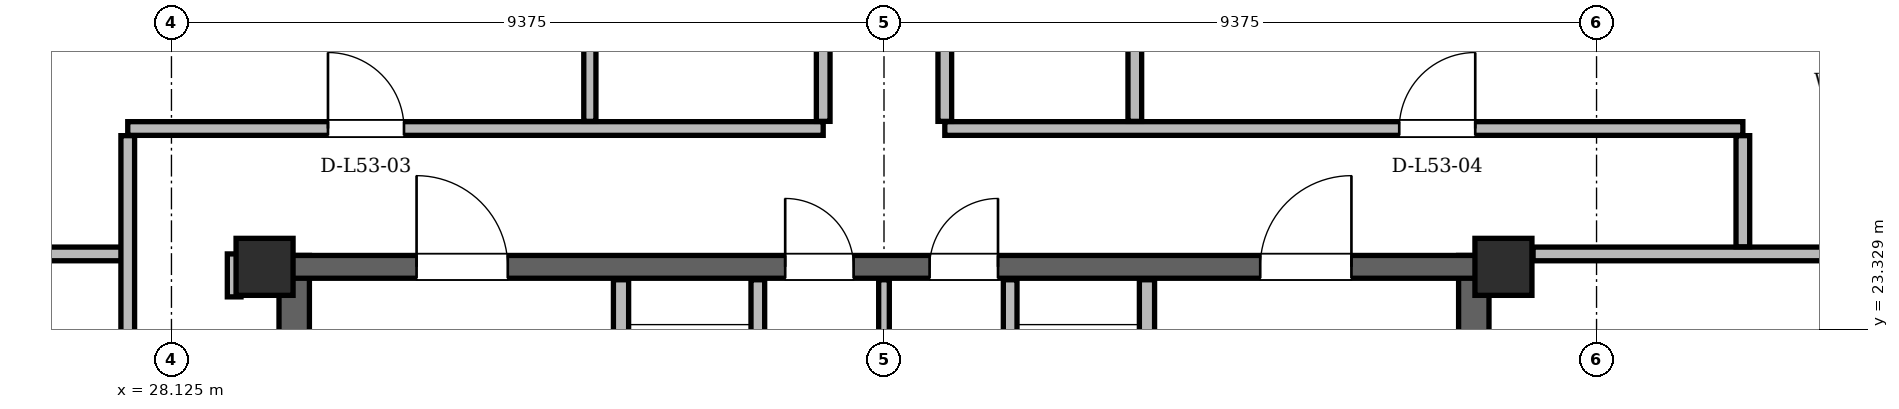
"""IFC4 building model, lengths in metres.
Left out: names, types, materials, properties, quantities, classifications, styles, units other than length and angle.
Written with IfcOpenShell. Run it as: python <this file> out.ifc"""

import sys

from ifc_helpers import new_model, si_unit, direction, frame, frame_2d, origin, origin_2d, place, context, subcontext, project, spatial, rectangle, hollow_rectangle, extrude, element, fill, save


model = new_model("IFC4")
c1 = context("Model", 3, precision=1e-05, world=origin(), true_north=direction((0.0, 1.0)))
c2 = subcontext(c1, "Body", "Model", "MODEL_VIEW")
j1 = project(units=[si_unit("LENGTHUNIT", "METRE"), si_unit("PLANEANGLEUNIT", "RADIAN")], contexts=[c1])
p1 = place(None, origin())
s1 = spatial("IfcSite", under=j1, at=p1, CompositionType="ELEMENT")
p2 = place(p1, origin())
s2 = spatial("IfcBuilding", under=s1, at=p2, CompositionType="ELEMENT")
p3 = place(p2, frame((0.0, 0.0, 201.0)))
s3 = spatial("IfcBuildingStorey", under=s2, at=p3, CompositionType="ELEMENT", Elevation=201.0)
for number, where, z_axis, x_axis in (
    (1, (45.65, 24.15, 0.0), (0.0, 0.0, 1.0), (1.0, 0.0, 0.0)),
    (2, (29.35, 24.15, 0.0), (0.0, 0.0, 1.0), (1.0, 0.0, 0.0)),
):
    element("IfcColumn", number, at=place(p3, frame(where, z_axis=z_axis, x_axis=x_axis)), inside=s3, PredefinedType="COLUMN", context=c2, shape_type="SweptSolid", body=[
        extrude(hollow_rectangle(XDim=0.75, YDim=0.75, WallThickness=0.06, at=origin_2d()), origin(), (0.0, 0.0, 1.0), 3.6),
    ])
for number, where, z_axis, x_axis in (
    (3, (29.74, 11.0, 0.0), (0.0, 0.0, 1.0), (0.0, 1.0, 0.0)),
    (4, (45.26, 11.0, 0.0), (0.0, 0.0, 1.0), (0.0, 1.0, 0.0)),
):
    element("IfcWall", number, at=place(p3, frame(where, z_axis=z_axis, x_axis=x_axis)), inside=s3, PredefinedType="SHEAR", context=c2, shape_type="SweptSolid", body=[
        extrude(rectangle(XDim=13.3, YDim=0.4, at=frame_2d((6.65, 0.0))), origin(), (0.0, 0.0, 1.0), 3.38),
    ])
p4 = place(p3, frame((29.65, 24.15, 0.0), z_axis=(0.0, 0.0, 1.0), x_axis=(1.0, 0.0, 0.0)))
e5 = element("IfcWall", 5, at=p4, inside=s3, PredefinedType="SHEAR", context=c2, shape_type="SweptSolid", body=[
    extrude(rectangle(XDim=15.7, YDim=0.3, at=frame_2d((7.85, 0.0))), origin(), (0.0, 0.0, 1.0), 3.38),
])
p5 = place(p4, frame((1.7, 0.0, 0.0)))
e6 = element("IfcOpeningElement", 6, at=p5, cuts=e5, PredefinedType="OPENING", context=c2, shape_type="SweptSolid", body=[
    extrude(rectangle(XDim=1.2, YDim=2.2, at=frame_2d((0.6, 1.1))), frame((0.0, 0.15, 0.0), z_axis=(0.0, -1.0, 0.0), x_axis=(1.0, 0.0, 0.0)), (0.0, 0.0, 1.0), 0.3),
])
p6 = place(p4, frame((12.8, 0.0, 0.0)))
e7 = element("IfcOpeningElement", 7, at=p6, cuts=e5, PredefinedType="OPENING", context=c2, shape_type="SweptSolid", body=[
    extrude(rectangle(XDim=1.2, YDim=2.2, at=frame_2d((0.6, 1.1))), frame((0.0, 0.15, 0.0), z_axis=(0.0, -1.0, 0.0), x_axis=(1.0, 0.0, 0.0)), (0.0, 0.0, 1.0), 0.3),
])
p7 = place(p4, frame((6.55, 0.0, 0.0)))
e8 = element("IfcOpeningElement", 8, at=p7, cuts=e5, PredefinedType="OPENING", context=c2, shape_type="SweptSolid", body=[
    extrude(rectangle(XDim=0.9, YDim=2.05, at=frame_2d((0.45, 1.025))), frame((0.0, 0.15, 0.0), z_axis=(0.0, -1.0, 0.0), x_axis=(1.0, 0.0, 0.0)), (0.0, 0.0, 1.0), 0.3),
])
p8 = place(p4, frame((8.45, 0.0, 0.0)))
e9 = element("IfcOpeningElement", 9, at=p8, cuts=e5, PredefinedType="OPENING", context=c2, shape_type="SweptSolid", body=[
    extrude(rectangle(XDim=0.9, YDim=2.05, at=frame_2d((0.45, 1.025))), frame((0.0, 0.15, 0.0), z_axis=(0.0, -1.0, 0.0), x_axis=(1.0, 0.0, 0.0)), (0.0, 0.0, 1.0), 0.3),
])
p9 = place(p3, frame((59.335, 11.719, 0.0), z_axis=(0.0, 0.0, 1.0), x_axis=(-0.500001310321, 0.866024647269, 0.0)))
e10 = element("IfcWall", 10, at=p9, inside=s3, PredefinedType="SOLIDWALL", context=c2, shape_type="SweptSolid", body=[
    extrude(rectangle(XDim=36.352, YDim=0.29, at=frame_2d((18.176, 0.0))), origin(), (0.0, 0.0, 1.0), 2.677),
])
p10 = place(p9, frame((6.579, 0.0, 0.0)))
e11 = element("IfcOpeningElement", 11, at=p10, cuts=e10, PredefinedType="OPENING", context=c2, shape_type="SweptSolid", body=[
    extrude(rectangle(XDim=1.5, YDim=2.2, at=frame_2d((0.75, 1.1))), frame((0.0, 0.145, 0.0), z_axis=(0.0, -1.0, 0.0), x_axis=(1.0, 0.0, 0.0)), (0.0, 0.0, 1.0), 0.29),
])
p11 = place(p9, frame((26.817, 0.0, 0.0)))
e12 = element("IfcOpeningElement", 12, at=p11, cuts=e10, PredefinedType="OPENING", context=c2, shape_type="SweptSolid", body=[
    extrude(rectangle(XDim=1.5, YDim=2.2, at=frame_2d((0.75, 1.1))), frame((0.0, 0.145, 0.0), z_axis=(0.0, -1.0, 0.0), x_axis=(1.0, 0.0, 0.0)), (0.0, 0.0, 1.0), 0.29),
])
p12 = place(p9, frame((34.299, 0.0, 0.85)))
e13 = element("IfcOpeningElement", 13, at=p12, cuts=e10, PredefinedType="OPENING", context=c2, shape_type="SweptSolid", body=[
    extrude(rectangle(XDim=1.2, YDim=1.48, at=frame_2d((0.6, 0.74))), frame((0.0, 0.145, 0.0), z_axis=(0.0, -1.0, 0.0), x_axis=(1.0, 0.0, 0.0)), (0.0, 0.0, 1.0), 0.29),
])
p13 = place(p9, frame((16.249, 0.0, 0.85)))
e14 = element("IfcOpeningElement", 14, at=p13, cuts=e10, PredefinedType="OPENING", context=c2, shape_type="SweptSolid", body=[
    extrude(rectangle(XDim=2.4, YDim=1.717, at=frame_2d((1.2, 0.858))), frame((0.0, 0.145, 0.0), z_axis=(0.0, -1.0, 0.0), x_axis=(1.0, 0.0, 0.0)), (0.0, 0.0, 1.0), 0.29),
])
p14 = place(p9, frame((22.63, 0.0, 0.85)))
e15 = element("IfcOpeningElement", 15, at=p14, cuts=e10, PredefinedType="OPENING", context=c2, shape_type="SweptSolid", body=[
    extrude(rectangle(XDim=1.8, YDim=1.717, at=frame_2d((0.9, 0.858))), frame((0.0, 0.145, 0.0), z_axis=(0.0, -1.0, 0.0), x_axis=(1.0, 0.0, 0.0)), (0.0, 0.0, 1.0), 0.29),
])
p15 = place(p9, frame((32.084, 0.0, 0.85)))
e16 = element("IfcOpeningElement", 16, at=p15, cuts=e10, PredefinedType="OPENING", context=c2, shape_type="SweptSolid", body=[
    extrude(rectangle(XDim=1.6, YDim=1.7, at=frame_2d((0.8, 0.85))), frame((0.0, 0.145, 0.0), z_axis=(0.0, -1.0, 0.0), x_axis=(1.0, 0.0, 0.0)), (0.0, 0.0, 1.0), 0.29),
])
p16 = place(p3, frame((33.841, 43.2, 0.0), z_axis=(0.0, 0.0, 1.0), x_axis=(-0.500001310321, -0.866024647269, 0.0)))
e17 = element("IfcWall", 17, at=p16, inside=s3, PredefinedType="SOLIDWALL", context=c2, shape_type="SweptSolid", body=[
    extrude(rectangle(XDim=36.352, YDim=0.29, at=frame_2d((18.176, 0.0))), origin(), (0.0, 0.0, 1.0), 2.677),
])
p17 = place(p16, frame((6.579, 0.0, 0.0)))
e18 = element("IfcOpeningElement", 18, at=p17, cuts=e17, PredefinedType="OPENING", context=c2, shape_type="SweptSolid", body=[
    extrude(rectangle(XDim=1.5, YDim=2.2, at=frame_2d((0.75, 1.1))), frame((0.0, 0.145, 0.0), z_axis=(0.0, -1.0, 0.0), x_axis=(1.0, 0.0, 0.0)), (0.0, 0.0, 1.0), 0.29),
])
p18 = place(p16, frame((26.818, 0.0, 0.0)))
e19 = element("IfcOpeningElement", 19, at=p18, cuts=e17, PredefinedType="OPENING", context=c2, shape_type="SweptSolid", body=[
    extrude(rectangle(XDim=1.5, YDim=2.2, at=frame_2d((0.75, 1.1))), frame((0.0, 0.145, 0.0), z_axis=(0.0, -1.0, 0.0), x_axis=(1.0, 0.0, 0.0)), (0.0, 0.0, 1.0), 0.29),
])
p19 = place(p16, frame((32.924, 0.0, 0.85)))
e20 = element("IfcOpeningElement", 20, at=p19, cuts=e17, PredefinedType="OPENING", context=c2, shape_type="SweptSolid", body=[
    extrude(rectangle(XDim=1.2, YDim=1.48, at=frame_2d((0.6, 0.74))), frame((0.0, 0.145, 0.0), z_axis=(0.0, -1.0, 0.0), x_axis=(1.0, 0.0, 0.0)), (0.0, 0.0, 1.0), 0.29),
])
p20 = place(p16, frame((21.949, 0.0, 0.85)))
e21 = element("IfcOpeningElement", 21, at=p20, cuts=e17, PredefinedType="OPENING", context=c2, shape_type="SweptSolid", body=[
    extrude(rectangle(XDim=2.0, YDim=1.717, at=frame_2d((1.0, 0.858))), frame((0.0, 0.145, 0.0), z_axis=(0.0, -1.0, 0.0), x_axis=(1.0, 0.0, 0.0)), (0.0, 0.0, 1.0), 0.29),
])
p21 = place(p16, frame((2.823, 0.0, 0.85)))
e22 = element("IfcOpeningElement", 22, at=p21, cuts=e17, PredefinedType="OPENING", context=c2, shape_type="SweptSolid", body=[
    extrude(rectangle(XDim=1.6, YDim=1.7, at=frame_2d((0.8, 0.85))), frame((0.0, 0.145, 0.0), z_axis=(0.0, -1.0, 0.0), x_axis=(1.0, 0.0, 0.0)), (0.0, 0.0, 1.0), 0.29),
])
p22 = place(p16, frame((15.99, 0.0, 0.85)))
e23 = element("IfcOpeningElement", 23, at=p22, cuts=e17, PredefinedType="OPENING", context=c2, shape_type="SweptSolid", body=[
    extrude(rectangle(XDim=3.0, YDim=1.717, at=frame_2d((1.5, 0.858))), frame((0.0, 0.145, 0.0), z_axis=(0.0, -1.0, 0.0), x_axis=(1.0, 0.0, 0.0)), (0.0, 0.0, 1.0), 0.29),
])
p23 = place(p3, frame((34.04, 19.48, 0.0), z_axis=(0.0, 0.0, 1.0), x_axis=(0.0, 1.0, 0.0)))
e24 = element("IfcWall", 24, at=p23, inside=s3, PredefinedType="PARTITIONING", context=c2, shape_type="SweptSolid", body=[
    extrude(rectangle(XDim=4.5, YDim=0.2, at=frame_2d((2.25, 0.0))), origin(), (0.0, 0.0, 1.0), 3.38),
])
p24 = place(p23, frame((2.12, 0.0, 0.0)))
e25 = element("IfcOpeningElement", 25, at=p24, cuts=e24, PredefinedType="OPENING", context=c2, shape_type="SweptSolid", body=[
    extrude(rectangle(XDim=1.1, YDim=2.2, at=frame_2d((0.55, 1.1))), frame((0.0, 0.1, 0.0), z_axis=(0.0, -1.0, 0.0), x_axis=(1.0, 0.0, 0.0)), (0.0, 0.0, 1.0), 0.2),
])
p25 = place(p3, frame((35.84, 20.96, 0.0), z_axis=(0.0, 0.0, 1.0), x_axis=(0.0, 1.0, 0.0)))
e26 = element("IfcWall", 26, at=p25, inside=s3, PredefinedType="PARTITIONING", context=c2, shape_type="SweptSolid", body=[
    extrude(rectangle(XDim=3.02, YDim=0.18, at=frame_2d((1.51, 0.0))), origin(), (0.0, 0.0, 1.0), 3.38),
])
p26 = place(p3, frame((40.96, 19.48, 0.0), z_axis=(0.0, 0.0, 1.0), x_axis=(0.0, 1.0, 0.0)))
e27 = element("IfcWall", 27, at=p26, inside=s3, PredefinedType="PARTITIONING", context=c2, shape_type="SweptSolid", body=[
    extrude(rectangle(XDim=4.5, YDim=0.2, at=frame_2d((2.25, 0.0))), origin(), (0.0, 0.0, 1.0), 3.38),
])
p27 = place(p26, frame((2.12, 0.0, 0.0)))
e28 = element("IfcOpeningElement", 28, at=p27, cuts=e27, PredefinedType="OPENING", context=c2, shape_type="SweptSolid", body=[
    extrude(rectangle(XDim=1.1, YDim=2.2, at=frame_2d((0.55, 1.1))), frame((0.0, 0.1, 0.0), z_axis=(0.0, -1.0, 0.0), x_axis=(1.0, 0.0, 0.0)), (0.0, 0.0, 1.0), 0.2),
])
p28 = place(p3, frame((39.16, 20.96, 0.0), z_axis=(0.0, 0.0, 1.0), x_axis=(0.0, 1.0, 0.0)))
e29 = element("IfcWall", 29, at=p28, inside=s3, PredefinedType="PARTITIONING", context=c2, shape_type="SweptSolid", body=[
    extrude(rectangle(XDim=3.02, YDim=0.18, at=frame_2d((1.51, 0.0))), origin(), (0.0, 0.0, 1.0), 3.38),
])
p29 = place(p3, frame((37.5, 21.06, 0.0), z_axis=(0.0, 0.0, 1.0), x_axis=(0.0, 1.0, 0.0)))
e30 = element("IfcWall", 30, at=p29, inside=s3, PredefinedType="PARTITIONING", context=c2, shape_type="SweptSolid", body=[
    extrude(rectangle(XDim=2.92, YDim=0.14, at=frame_2d((1.46, 0.0))), origin(), (0.0, 0.0, 1.0), 3.38),
])
p30 = place(p3, frame((23.112, 24.32, 0.0), z_axis=(0.0, 0.0, 1.0), x_axis=(1.0, 0.0, 0.0)))
e31 = element("IfcWall", 31, at=p30, inside=s3, PredefinedType="PARTITIONING", context=c2, shape_type="SweptSolid", body=[
    extrude(rectangle(XDim=4.498, YDim=0.18, at=frame_2d((2.249, 0.0))), origin(), (0.0, 0.0, 1.0), 3.38),
])
p31 = place(p3, frame((46.04, 24.32, 0.0), z_axis=(0.0, 0.0, 1.0), x_axis=(1.0, 0.0, 0.0)))
e32 = element("IfcWall", 32, at=p31, inside=s3, PredefinedType="PARTITIONING", context=c2, shape_type="SweptSolid", body=[
    extrude(rectangle(XDim=5.848, YDim=0.18, at=frame_2d((2.924, 0.0))), origin(), (0.0, 0.0, 1.0), 3.38),
])
p32 = place(p3, frame((27.55, 25.97, 0.0), z_axis=(0.0, 0.0, 1.0), x_axis=(1.0, 0.0, 0.0)))
e33 = element("IfcWall", 33, at=p32, inside=s3, PredefinedType="PARTITIONING", context=c2, shape_type="SweptSolid", body=[
    extrude(rectangle(XDim=9.15, YDim=0.18, at=frame_2d((4.575, 0.0))), origin(), (0.0, 0.0, 1.0), 2.913),
])
p33 = place(p32, frame((2.635, 0.0, 0.0)))
e34 = element("IfcOpeningElement", 34, at=p33, cuts=e33, PredefinedType="OPENING", context=c2, shape_type="SweptSolid", body=[
    extrude(rectangle(XDim=1.0, YDim=2.18, at=frame_2d((0.5, 1.09))), frame((0.0, 0.09, 0.0), z_axis=(0.0, -1.0, 0.0), x_axis=(1.0, 0.0, 0.0)), (0.0, 0.0, 1.0), 0.18),
])
p34 = place(p3, frame((38.3, 25.97, 0.0), z_axis=(0.0, 0.0, 1.0), x_axis=(1.0, 0.0, 0.0)))
e35 = element("IfcWall", 35, at=p34, inside=s3, PredefinedType="PARTITIONING", context=c2, shape_type="SweptSolid", body=[
    extrude(rectangle(XDim=10.5, YDim=0.18, at=frame_2d((5.25, 0.0))), origin(), (0.0, 0.0, 1.0), 2.913),
])
p35 = place(p34, frame((5.979, 0.0, 0.0)))
e36 = element("IfcOpeningElement", 36, at=p35, cuts=e35, PredefinedType="OPENING", context=c2, shape_type="SweptSolid", body=[
    extrude(rectangle(XDim=1.0, YDim=2.18, at=frame_2d((0.5, 1.09))), frame((0.0, 0.09, 0.0), z_axis=(0.0, -1.0, 0.0), x_axis=(1.0, 0.0, 0.0)), (0.0, 0.0, 1.0), 0.18),
])
p36 = place(p3, frame((27.55, 18.544, 0.0), z_axis=(0.0, 0.0, 1.0), x_axis=(0.0, 1.0, 0.0)))
e37 = element("IfcWall", 37, at=p36, inside=s3, PredefinedType="PARTITIONING", context=c2, shape_type="SweptSolid", body=[
    extrude(rectangle(XDim=7.332, YDim=0.18, at=frame_2d((3.666, 0.0))), origin(), (0.0, 0.0, 1.0), 3.38),
])
p37 = place(p3, frame((28.95, 23.755, 0.0), z_axis=(0.0, 0.0, 1.0), x_axis=(0.0, 1.0, 0.0)))
e38 = element("IfcWall", 38, at=p37, inside=s3, PredefinedType="PARTITIONING", context=c2, shape_type="SweptSolid", body=[
    extrude(rectangle(XDim=0.565, YDim=0.18, at=frame_2d((0.283, 0.0))), origin(), (0.0, 0.0, 1.0), 3.38),
])
p38 = place(p3, frame((33.63, 26.064, 0.0), z_axis=(0.0, 0.0, 1.0), x_axis=(0.0, 1.0, 0.0)))
e39 = element("IfcWall", 39, at=p38, inside=s3, PredefinedType="PARTITIONING", context=c2, shape_type="SweptSolid", body=[
    extrude(rectangle(XDim=16.474, YDim=0.16, at=frame_2d((8.237, 0.0))), origin(), (0.0, 0.0, 1.0), 2.913),
])
p39 = place(p38, frame((1.225, 0.0, 0.0)))
e40 = element("IfcOpeningElement", 40, at=p39, cuts=e39, PredefinedType="OPENING", context=c2, shape_type="SweptSolid", body=[
    extrude(rectangle(XDim=0.92, YDim=2.12, at=frame_2d((0.46, 1.06))), frame((0.0, 0.08, 0.0), z_axis=(0.0, -1.0, 0.0), x_axis=(1.0, 0.0, 0.0)), (0.0, 0.0, 1.0), 0.16),
])
p40 = place(p38, frame((4.721, 0.0, 0.0)))
e41 = element("IfcOpeningElement", 41, at=p40, cuts=e39, PredefinedType="OPENING", context=c2, shape_type="SweptSolid", body=[
    extrude(rectangle(XDim=0.92, YDim=2.12, at=frame_2d((0.46, 1.06))), frame((0.0, 0.08, 0.0), z_axis=(0.0, -1.0, 0.0), x_axis=(1.0, 0.0, 0.0)), (0.0, 0.0, 1.0), 0.16),
])
p41 = place(p38, frame((7.721, 0.0, 0.0)))
e42 = element("IfcOpeningElement", 42, at=p41, cuts=e39, PredefinedType="OPENING", context=c2, shape_type="SweptSolid", body=[
    extrude(rectangle(XDim=0.95, YDim=2.1, at=frame_2d((0.475, 1.05))), frame((0.0, 0.08, 0.0), z_axis=(0.0, -1.0, 0.0), x_axis=(1.0, 0.0, 0.0)), (0.0, 0.0, 1.0), 0.16),
])
p42 = place(p38, frame((10.253, 0.0, 0.0)))
e43 = element("IfcOpeningElement", 43, at=p42, cuts=e39, PredefinedType="OPENING", context=c2, shape_type="SweptSolid", body=[
    extrude(rectangle(XDim=0.95, YDim=2.1, at=frame_2d((0.475, 1.05))), frame((0.0, 0.08, 0.0), z_axis=(0.0, -1.0, 0.0), x_axis=(1.0, 0.0, 0.0)), (0.0, 0.0, 1.0), 0.16),
])
p43 = place(p38, frame((12.782, 0.0, 0.0)))
e44 = element("IfcOpeningElement", 44, at=p43, cuts=e39, PredefinedType="OPENING", context=c2, shape_type="SweptSolid", body=[
    extrude(rectangle(XDim=0.95, YDim=2.1, at=frame_2d((0.475, 1.05))), frame((0.0, 0.08, 0.0), z_axis=(0.0, -1.0, 0.0), x_axis=(1.0, 0.0, 0.0)), (0.0, 0.0, 1.0), 0.16),
])
p44 = place(p38, frame((14.931, 0.0, 0.0)))
e45 = element("IfcOpeningElement", 45, at=p44, cuts=e39, PredefinedType="OPENING", context=c2, shape_type="SweptSolid", body=[
    extrude(rectangle(XDim=0.88, YDim=2.08, at=frame_2d((0.44, 1.04))), frame((0.0, 0.08, 0.0), z_axis=(0.0, -1.0, 0.0), x_axis=(1.0, 0.0, 0.0)), (0.0, 0.0, 1.0), 0.16),
])
p45 = place(p3, frame((36.7, 26.064, 0.0), z_axis=(0.0, 0.0, 1.0), x_axis=(0.0, 1.0, 0.0)))
e46 = element("IfcWall", 46, at=p45, inside=s3, PredefinedType="PARTITIONING", context=c2, shape_type="SweptSolid", body=[
    extrude(rectangle(XDim=16.988, YDim=0.18, at=frame_2d((8.494, 0.0))), origin(), (0.0, 0.0, 1.0), 3.38),
])
p46 = place(p3, frame((38.3, 26.064, 0.0), z_axis=(0.0, 0.0, 1.0), x_axis=(0.0, 1.0, 0.0)))
e47 = element("IfcWall", 47, at=p46, inside=s3, PredefinedType="PARTITIONING", context=c2, shape_type="SweptSolid", body=[
    extrude(rectangle(XDim=6.042, YDim=0.18, at=frame_2d((3.021, 0.0))), origin(), (0.0, 0.0, 1.0), 3.38),
])
p47 = place(p46, frame((4.891, 0.0, 0.0)))
e48 = element("IfcOpeningElement", 48, at=p47, cuts=e47, PredefinedType="OPENING", context=c2, shape_type="SweptSolid", body=[
    extrude(rectangle(XDim=1.0, YDim=2.18, at=frame_2d((0.5, 1.09))), frame((0.0, 0.09, 0.0), z_axis=(0.0, -1.0, 0.0), x_axis=(1.0, 0.0, 0.0)), (0.0, 0.0, 1.0), 0.18),
])
p48 = place(p3, frame((40.8, 26.064, 0.0), z_axis=(0.0, 0.0, 1.0), x_axis=(0.0, 1.0, 0.0)))
e49 = element("IfcWall", 49, at=p48, inside=s3, PredefinedType="PARTITIONING", context=c2, shape_type="SweptSolid", body=[
    extrude(rectangle(XDim=16.767, YDim=0.18, at=frame_2d((8.383, 0.0))), origin(), (0.0, 0.0, 1.0), 3.38),
])
p49 = place(p3, frame((48.8, 24.414, 0.0), z_axis=(0.0, 0.0, 1.0), x_axis=(0.0, 1.0, 0.0)))
e50 = element("IfcWall", 50, at=p49, inside=s3, PredefinedType="PARTITIONING", context=c2, shape_type="SweptSolid", body=[
    extrude(rectangle(XDim=1.462, YDim=0.18, at=frame_2d((0.731, 0.0))), origin(), (0.0, 0.0, 1.0), 3.38),
])
p50 = place(p5, origin())
e51 = element("IfcDoor", 51, at=p50, inside=s3, OperationType="SINGLE_SWING_LEFT", PredefinedType="DOOR", context=c2, shape_type="SweptSolid", body=[
    extrude(rectangle(XDim=1.2, YDim=2.2, at=frame_2d((0.6, 1.1))), frame((0.0, 0.025, 0.0), z_axis=(0.0, -1.0, 0.0), x_axis=(1.0, 0.0, 0.0)), (0.0, 0.0, 1.0), 0.05),
])
fill(e6, e51)
p51 = place(p6, origin())
e52 = element("IfcDoor", 52, at=p51, inside=s3, OperationType="SINGLE_SWING_RIGHT", PredefinedType="DOOR", context=c2, shape_type="SweptSolid", body=[
    extrude(rectangle(XDim=1.2, YDim=2.2, at=frame_2d((0.6, 1.1))), frame((0.0, 0.025, 0.0), z_axis=(0.0, -1.0, 0.0), x_axis=(1.0, 0.0, 0.0)), (0.0, 0.0, 1.0), 0.05),
])
fill(e7, e52)
p52 = place(p7, origin())
e53 = element("IfcDoor", 53, at=p52, inside=s3, OperationType="SINGLE_SWING_LEFT", PredefinedType="DOOR", context=c2, shape_type="SweptSolid", body=[
    extrude(rectangle(XDim=0.9, YDim=2.05, at=frame_2d((0.45, 1.025))), frame((0.0, 0.025, 0.0), z_axis=(0.0, -1.0, 0.0), x_axis=(1.0, 0.0, 0.0)), (0.0, 0.0, 1.0), 0.05),
])
fill(e8, e53)
p53 = place(p8, origin())
e54 = element("IfcDoor", 54, at=p53, inside=s3, OperationType="SINGLE_SWING_RIGHT", PredefinedType="DOOR", context=c2, shape_type="SweptSolid", body=[
    extrude(rectangle(XDim=0.9, YDim=2.05, at=frame_2d((0.45, 1.025))), frame((0.0, 0.025, 0.0), z_axis=(0.0, -1.0, 0.0), x_axis=(1.0, 0.0, 0.0)), (0.0, 0.0, 1.0), 0.05),
])
fill(e9, e54)
p54 = place(p33, origin())
e55 = element("IfcDoor", 55, at=p54, inside=s3, OperationType="SINGLE_SWING_LEFT", PredefinedType="DOOR", context=c2, shape_type="SweptSolid", body=[
    extrude(rectangle(XDim=1.0, YDim=2.18, at=frame_2d((0.5, 1.09))), frame((0.0, 0.025, 0.0), z_axis=(0.0, -1.0, 0.0), x_axis=(1.0, 0.0, 0.0)), (0.0, 0.0, 1.0), 0.05),
])
fill(e34, e55)
p55 = place(p35, origin())
e56 = element("IfcDoor", 56, at=p55, inside=s3, OperationType="SINGLE_SWING_RIGHT", PredefinedType="DOOR", context=c2, shape_type="SweptSolid", body=[
    extrude(rectangle(XDim=1.0, YDim=2.18, at=frame_2d((0.5, 1.09))), frame((0.0, 0.025, 0.0), z_axis=(0.0, -1.0, 0.0), x_axis=(1.0, 0.0, 0.0)), (0.0, 0.0, 1.0), 0.05),
])
fill(e36, e56)
save(model, sys.argv[1])
